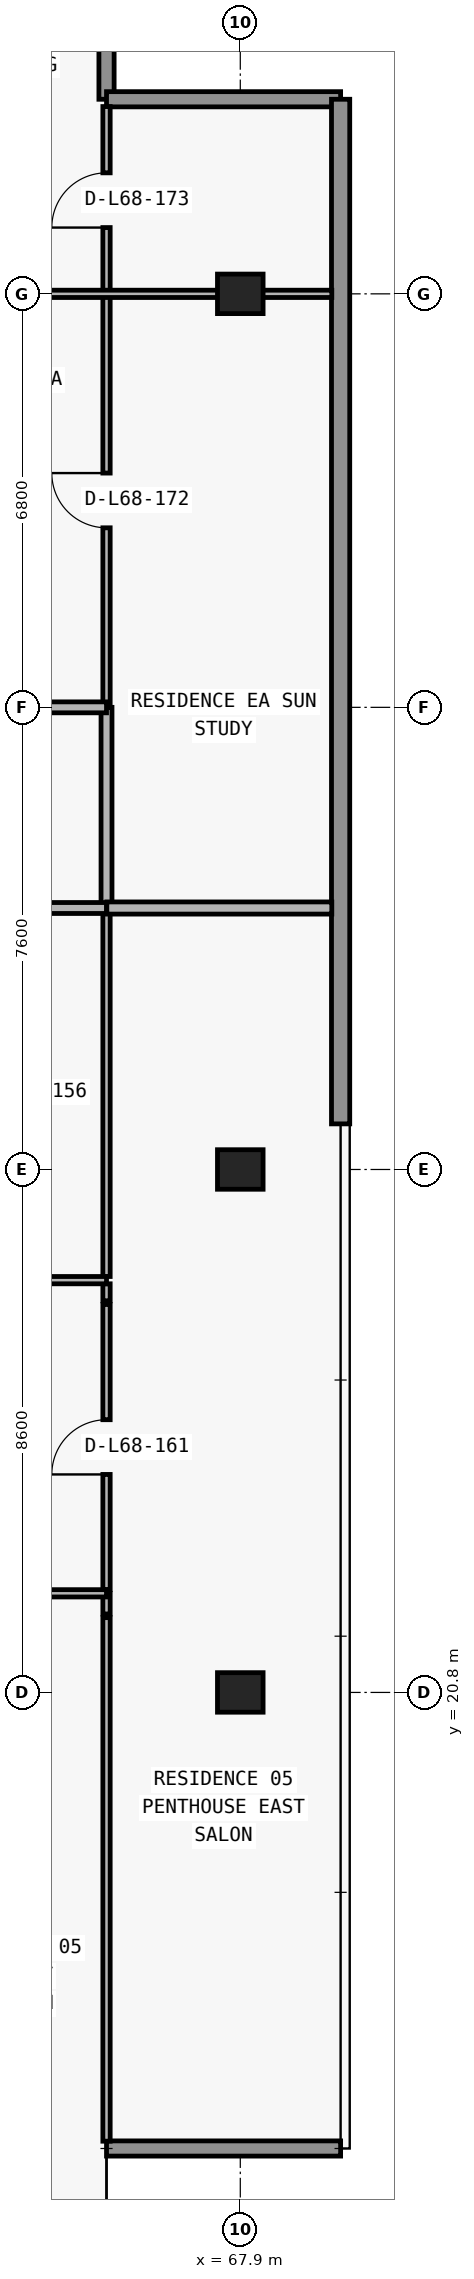
"""IFC4 building model, lengths in metres.
Left out: names, types, materials, properties, quantities, classifications, styles, units other than length and angle.
Written with IfcOpenShell. Run it as: python <this file> out.ifc"""

import sys

from ifc_helpers import new_model, si_unit, direction, frame, frame_2d, origin, origin_2d, place, context, subcontext, project, spatial, rectangle, extrude, element, fill, save


model = new_model("IFC4")
c1 = context("Model", 3, precision=1e-05, world=origin(), true_north=direction((0.0, 1.0)))
c2 = subcontext(c1, "Body", "Model", "MODEL_VIEW")
j1 = project(units=[si_unit("LENGTHUNIT", "METRE"), si_unit("PLANEANGLEUNIT", "RADIAN")], contexts=[c1])
p1 = place(None, origin())
s1 = spatial("IfcSite", under=j1, at=p1, CompositionType="ELEMENT")
p2 = place(p1, origin())
s2 = spatial("IfcBuilding", under=s1, at=p2, CompositionType="ELEMENT")
p3 = place(p2, frame((0.0, 0.0, 243.0)))
s3 = spatial("IfcBuildingStorey", under=s2, at=p3, CompositionType="ELEMENT", Elevation=243.0)
for number, where, z_axis, x_axis in (
    (1, (67.9, 20.8, 0.0), (0.0, 0.0, 1.0), (1.0, 0.0, 0.0)),
    (2, (67.9, 29.4, 0.0), (0.0, 0.0, 1.0), (1.0, 0.0, 0.0)),
    (3, (67.9, 43.8, 0.0), (0.0, 0.0, 1.0), (1.0, 0.0, 0.0)),
):
    element("IfcColumn", number, at=place(p3, frame(where, z_axis=z_axis, x_axis=x_axis)), inside=s3, PredefinedType="COLUMN", context=c2, shape_type="SweptSolid", body=[
        extrude(rectangle(XDim=0.75, YDim=0.65, at=origin_2d()), origin(), (0.0, 0.0, 1.0), 3.05),
    ])
p4 = place(p3, frame((65.7, 13.3, 0.0), z_axis=(0.0, 0.0, 1.0), x_axis=(1.0, 0.0, 0.0)))
e4 = element("IfcWall", 4, at=p4, inside=s3, PredefinedType="ELEMENTEDWALL", context=c2, shape_type="SweptSolid", body=[
    extrude(rectangle(XDim=3.85, YDim=0.25, at=frame_2d((1.925, 0.0))), origin(), (0.0, 0.0, 1.0), 3.05),
])
p5 = place(p3, frame((65.7, 50.45, 0.0), z_axis=(0.0, 0.0, 1.0), x_axis=(0.0, -1.0, 0.0)))
e5 = element("IfcWall", 5, at=p5, inside=s3, PredefinedType="ELEMENTEDWALL", context=c2, shape_type="SweptSolid", body=[
    extrude(rectangle(XDim=3.45, YDim=0.25, at=frame_2d((1.725, 0.0))), origin(), (0.0, 0.0, 1.0), 3.05),
])
p6 = place(p3, frame((65.7, 47.0, 0.0), z_axis=(0.0, 0.0, 1.0), x_axis=(1.0, 0.0, 0.0)))
e6 = element("IfcWall", 6, at=p6, inside=s3, PredefinedType="ELEMENTEDWALL", context=c2, shape_type="SweptSolid", body=[
    extrude(rectangle(XDim=3.85, YDim=0.25, at=frame_2d((1.925, 0.0))), origin(), (0.0, 0.0, 1.0), 3.05),
])
p7 = place(p3, frame((69.55, 47.0, 0.0), z_axis=(0.0, 0.0, 1.0), x_axis=(0.0, -1.0, 0.0)))
e7 = element("IfcWall", 7, at=p7, inside=s3, PredefinedType="STANDARD", context=c2, shape_type="SweptSolid", body=[
    extrude(rectangle(XDim=16.85, YDim=0.3, at=frame_2d((8.425, 0.0))), origin(), (0.0, 0.0, 1.0), 3.05),
])
p8 = place(p3, frame((65.7, 13.42, 0.0), z_axis=(0.0, 0.0, 1.0), x_axis=(0.0, 1.0, 0.0)))
e8 = element("IfcWall", 8, at=p8, inside=s3, PredefinedType="PARTITIONING", context=c2, shape_type="SweptSolid", body=[
    extrude(rectangle(XDim=8.61, YDim=0.12, at=frame_2d((4.305, 0.0))), origin(), (0.0, 0.0, 1.0), 3.05),
])
p9 = place(p3, frame((65.7, 22.09, 0.0), z_axis=(0.0, 0.0, 1.0), x_axis=(0.0, 1.0, 0.0)))
e9 = element("IfcWall", 9, at=p9, inside=s3, PredefinedType="PARTITIONING", context=c2, shape_type="SweptSolid", body=[
    extrude(rectangle(XDim=0.34, YDim=0.12, at=frame_2d((0.17, 0.0))), origin(), (0.0, 0.0, 1.0), 3.05),
])
p10 = place(p3, frame((65.7, 22.49, 0.0), z_axis=(0.0, 0.0, 1.0), x_axis=(0.0, 1.0, 0.0)))
e10 = element("IfcWall", 10, at=p10, inside=s3, PredefinedType="PARTITIONING", context=c2, shape_type="SweptSolid", body=[
    extrude(rectangle(XDim=4.69, YDim=0.12, at=frame_2d((2.345, 0.0))), origin(), (0.0, 0.0, 1.0), 3.05),
])
p11 = place(p10, frame((1.895, 0.0, 0.0)))
e11 = element("IfcOpeningElement", 11, at=p11, cuts=e10, PredefinedType="OPENING", context=c2, shape_type="SweptSolid", body=[
    extrude(rectangle(XDim=0.9, YDim=2.15, at=frame_2d((0.45, 1.075))), frame((0.0, 0.07, 0.0), z_axis=(0.0, -1.0, 0.0), x_axis=(1.0, 0.0, 0.0)), (0.0, 0.0, 1.0), 0.14),
])
p12 = place(p3, frame((65.7, 27.24, 0.0), z_axis=(0.0, 0.0, 1.0), x_axis=(0.0, 1.0, 0.0)))
e12 = element("IfcWall", 12, at=p12, inside=s3, PredefinedType="PARTITIONING", context=c2, shape_type="SweptSolid", body=[
    extrude(rectangle(XDim=0.28, YDim=0.12, at=frame_2d((0.14, 0.0))), origin(), (0.0, 0.0, 1.0), 3.05),
])
p13 = place(p3, frame((65.7, 27.64, 0.0), z_axis=(0.0, 0.0, 1.0), x_axis=(0.0, 1.0, 0.0)))
e13 = element("IfcWall", 13, at=p13, inside=s3, PredefinedType="PARTITIONING", context=c2, shape_type="SweptSolid", body=[
    extrude(rectangle(XDim=6.06, YDim=0.12, at=frame_2d((3.03, 0.0))), origin(), (0.0, 0.0, 1.0), 3.05),
])
p14 = place(p3, frame((65.7, 33.705, 0.0), z_axis=(0.0, 0.0, 1.0), x_axis=(0.0, 1.0, 0.0)))
e14 = element("IfcWall", 14, at=p14, inside=s3, PredefinedType="PARTITIONING", context=c2, shape_type="SweptSolid", body=[
    extrude(rectangle(XDim=3.295, YDim=0.18, at=frame_2d((1.647, 0.0))), origin(), (0.0, 0.0, 1.0), 3.05),
])
p15 = place(p3, frame((65.7, 37.005, 0.0), z_axis=(0.0, 0.0, 1.0), x_axis=(0.0, 1.0, 0.0)))
e15 = element("IfcWall", 15, at=p15, inside=s3, PredefinedType="PARTITIONING", context=c2, shape_type="SweptSolid", body=[
    extrude(rectangle(XDim=9.875, YDim=0.12, at=frame_2d((4.938, 0.0))), origin(), (0.0, 0.0, 1.0), 3.05),
])
p16 = place(p15, frame((2.948, 0.0, 0.0)))
e16 = element("IfcOpeningElement", 16, at=p16, cuts=e15, PredefinedType="OPENING", context=c2, shape_type="SweptSolid", body=[
    extrude(rectangle(XDim=0.9, YDim=2.15, at=frame_2d((0.45, 1.075))), frame((0.0, 0.07, 0.0), z_axis=(0.0, -1.0, 0.0), x_axis=(1.0, 0.0, 0.0)), (0.0, 0.0, 1.0), 0.14),
])
p17 = place(p15, frame((7.885, 0.0, 0.0)))
e17 = element("IfcOpeningElement", 17, at=p17, cuts=e15, PredefinedType="OPENING", context=c2, shape_type="SweptSolid", body=[
    extrude(rectangle(XDim=0.9, YDim=2.15, at=frame_2d((0.45, 1.075))), frame((0.0, 0.07, 0.0), z_axis=(0.0, -1.0, 0.0), x_axis=(1.0, 0.0, 0.0)), (0.0, 0.0, 1.0), 0.14),
])
p18 = place(p3, frame((59.5, 22.43, 0.0), z_axis=(0.0, 0.0, 1.0), x_axis=(1.0, 0.0, 0.0)))
e18 = element("IfcWall", 18, at=p18, inside=s3, PredefinedType="PARTITIONING", context=c2, shape_type="SweptSolid", body=[
    extrude(rectangle(XDim=6.2, YDim=0.12, at=frame_2d((3.1, 0.0))), origin(), (0.0, 0.0, 1.0), 3.05),
])
p19 = place(p18, frame((1.1, 0.0, 0.0)))
e19 = element("IfcOpeningElement", 19, at=p19, cuts=e18, PredefinedType="OPENING", context=c2, shape_type="SweptSolid", body=[
    extrude(rectangle(XDim=0.9, YDim=2.15, at=frame_2d((0.45, 1.075))), frame((0.0, 0.07, 0.0), z_axis=(0.0, -1.0, 0.0), x_axis=(1.0, 0.0, 0.0)), (0.0, 0.0, 1.0), 0.14),
])
p20 = place(p18, frame((4.2, 0.0, 0.0)))
e20 = element("IfcOpeningElement", 20, at=p20, cuts=e18, PredefinedType="OPENING", context=c2, shape_type="SweptSolid", body=[
    extrude(rectangle(XDim=0.9, YDim=2.15, at=frame_2d((0.45, 1.075))), frame((0.0, 0.07, 0.0), z_axis=(0.0, -1.0, 0.0), x_axis=(1.0, 0.0, 0.0)), (0.0, 0.0, 1.0), 0.14),
])
p21 = place(p3, frame((59.5, 27.58, 0.0), z_axis=(0.0, 0.0, 1.0), x_axis=(1.0, 0.0, 0.0)))
e21 = element("IfcWall", 21, at=p21, inside=s3, PredefinedType="PARTITIONING", context=c2, shape_type="SweptSolid", body=[
    extrude(rectangle(XDim=6.2, YDim=0.12, at=frame_2d((3.1, 0.0))), origin(), (0.0, 0.0, 1.0), 3.05),
])
p22 = place(p21, frame((1.809, 0.0, 0.0)))
e22 = element("IfcOpeningElement", 22, at=p22, cuts=e21, PredefinedType="OPENING", context=c2, shape_type="SweptSolid", body=[
    extrude(rectangle(XDim=0.9, YDim=2.15, at=frame_2d((0.45, 1.075))), frame((0.0, 0.07, 0.0), z_axis=(0.0, -1.0, 0.0), x_axis=(1.0, 0.0, 0.0)), (0.0, 0.0, 1.0), 0.14),
])
p23 = place(p3, frame((41.2, 33.7, 0.0), z_axis=(0.0, 0.0, 1.0), x_axis=(1.0, 0.0, 0.0)))
e23 = element("IfcWall", 23, at=p23, inside=s3, PredefinedType="PARTITIONING", context=c2, shape_type="SweptSolid", body=[
    extrude(rectangle(XDim=24.5, YDim=0.18, at=frame_2d((12.25, 0.0))), origin(), (0.0, 0.0, 1.0), 3.05),
])
p24 = place(p23, frame((12.775, 0.0, 0.0)))
e24 = element("IfcOpeningElement", 24, at=p24, cuts=e23, PredefinedType="OPENING", context=c2, shape_type="SweptSolid", body=[
    extrude(rectangle(XDim=1.0, YDim=2.2, at=frame_2d((0.5, 1.1))), frame((0.0, 0.1, 0.0), z_axis=(0.0, -1.0, 0.0), x_axis=(1.0, 0.0, 0.0)), (0.0, 0.0, 1.0), 0.2),
])
p25 = place(p23, frame((20.059, 0.0, 0.0)))
e25 = element("IfcOpeningElement", 25, at=p25, cuts=e23, PredefinedType="OPENING", context=c2, shape_type="SweptSolid", body=[
    extrude(rectangle(XDim=1.0, YDim=2.2, at=frame_2d((0.5, 1.1))), frame((0.0, 0.1, 0.0), z_axis=(0.0, -1.0, 0.0), x_axis=(1.0, 0.0, 0.0)), (0.0, 0.0, 1.0), 0.2),
])
p26 = place(p3, frame((65.705, 33.7, 0.0), z_axis=(0.0, 0.0, 1.0), x_axis=(1.0, 0.0, 0.0)))
e26 = element("IfcWall", 26, at=p26, inside=s3, PredefinedType="PARTITIONING", context=c2, shape_type="SweptSolid", body=[
    extrude(rectangle(XDim=3.7, YDim=0.2, at=frame_2d((1.85, 0.0))), origin(), (0.0, 0.0, 1.0), 3.05),
])
p27 = place(p3, frame((59.855, 37.0, 0.0), z_axis=(0.0, 0.0, 1.0), x_axis=(1.0, 0.0, 0.0)))
e27 = element("IfcWall", 27, at=p27, inside=s3, PredefinedType="PARTITIONING", context=c2, shape_type="SweptSolid", body=[
    extrude(rectangle(XDim=5.845, YDim=0.18, at=frame_2d((2.922, 0.0))), origin(), (0.0, 0.0, 1.0), 3.05),
])
p28 = place(p27, frame((3.57, 0.0, 0.0)))
e28 = element("IfcOpeningElement", 28, at=p28, cuts=e27, PredefinedType="OPENING", context=c2, shape_type="SweptSolid", body=[
    extrude(rectangle(XDim=1.0, YDim=2.2, at=frame_2d((0.5, 1.1))), frame((0.0, 0.1, 0.0), z_axis=(0.0, -1.0, 0.0), x_axis=(1.0, 0.0, 0.0)), (0.0, 0.0, 1.0), 0.2),
])
p29 = place(p3, frame((59.845, 43.8, 0.0), z_axis=(0.0, 0.0, 1.0), x_axis=(1.0, 0.0, 0.0)))
e29 = element("IfcWall", 29, at=p29, inside=s3, PredefinedType="PARTITIONING", context=c2, shape_type="SweptSolid", body=[
    extrude(rectangle(XDim=9.56, YDim=0.12, at=frame_2d((4.78, 0.0))), origin(), (0.0, 0.0, 1.0), 2.418),
])
p30 = place(p29, frame((3.63, 0.0, 0.0)))
e30 = element("IfcOpeningElement", 30, at=p30, cuts=e29, PredefinedType="OPENING", context=c2, shape_type="SweptSolid", body=[
    extrude(rectangle(XDim=0.9, YDim=2.15, at=frame_2d((0.45, 1.075))), frame((0.0, 0.07, 0.0), z_axis=(0.0, -1.0, 0.0), x_axis=(1.0, 0.0, 0.0)), (0.0, 0.0, 1.0), 0.14),
])
p31 = place(p29, frame((0.728, 0.0, 0.0)))
e31 = element("IfcOpeningElement", 31, at=p31, cuts=e29, PredefinedType="OPENING", context=c2, shape_type="SweptSolid", body=[
    extrude(rectangle(XDim=0.85, YDim=2.1, at=frame_2d((0.425, 1.05))), frame((0.0, 0.07, 0.0), z_axis=(0.0, -1.0, 0.0), x_axis=(1.0, 0.0, 0.0)), (0.0, 0.0, 1.0), 0.14),
])
p32 = place(p11, origin())
e32 = element("IfcDoor", 32, at=p32, inside=s3, OperationType="SINGLE_SWING_LEFT", PredefinedType="DOOR", context=c2, shape_type="SweptSolid", body=[
    extrude(rectangle(XDim=0.9, YDim=2.15, at=frame_2d((0.45, 1.075))), frame((0.0, 0.025, 0.0), z_axis=(0.0, -1.0, 0.0), x_axis=(1.0, 0.0, 0.0)), (0.0, 0.0, 1.0), 0.05),
])
fill(e11, e32)
p33 = place(p16, origin())
e33 = element("IfcDoor", 33, at=p33, inside=s3, OperationType="SINGLE_SWING_RIGHT", PredefinedType="DOOR", context=c2, shape_type="SweptSolid", body=[
    extrude(rectangle(XDim=0.9, YDim=2.15, at=frame_2d((0.45, 1.075))), frame((0.0, 0.025, 0.0), z_axis=(0.0, -1.0, 0.0), x_axis=(1.0, 0.0, 0.0)), (0.0, 0.0, 1.0), 0.05),
])
fill(e16, e33)
p34 = place(p17, origin())
e34 = element("IfcDoor", 34, at=p34, inside=s3, OperationType="SINGLE_SWING_LEFT", PredefinedType="DOOR", context=c2, shape_type="SweptSolid", body=[
    extrude(rectangle(XDim=0.9, YDim=2.15, at=frame_2d((0.45, 1.075))), frame((0.0, 0.025, 0.0), z_axis=(0.0, -1.0, 0.0), x_axis=(1.0, 0.0, 0.0)), (0.0, 0.0, 1.0), 0.05),
])
fill(e17, e34)
save(model, sys.argv[1])
